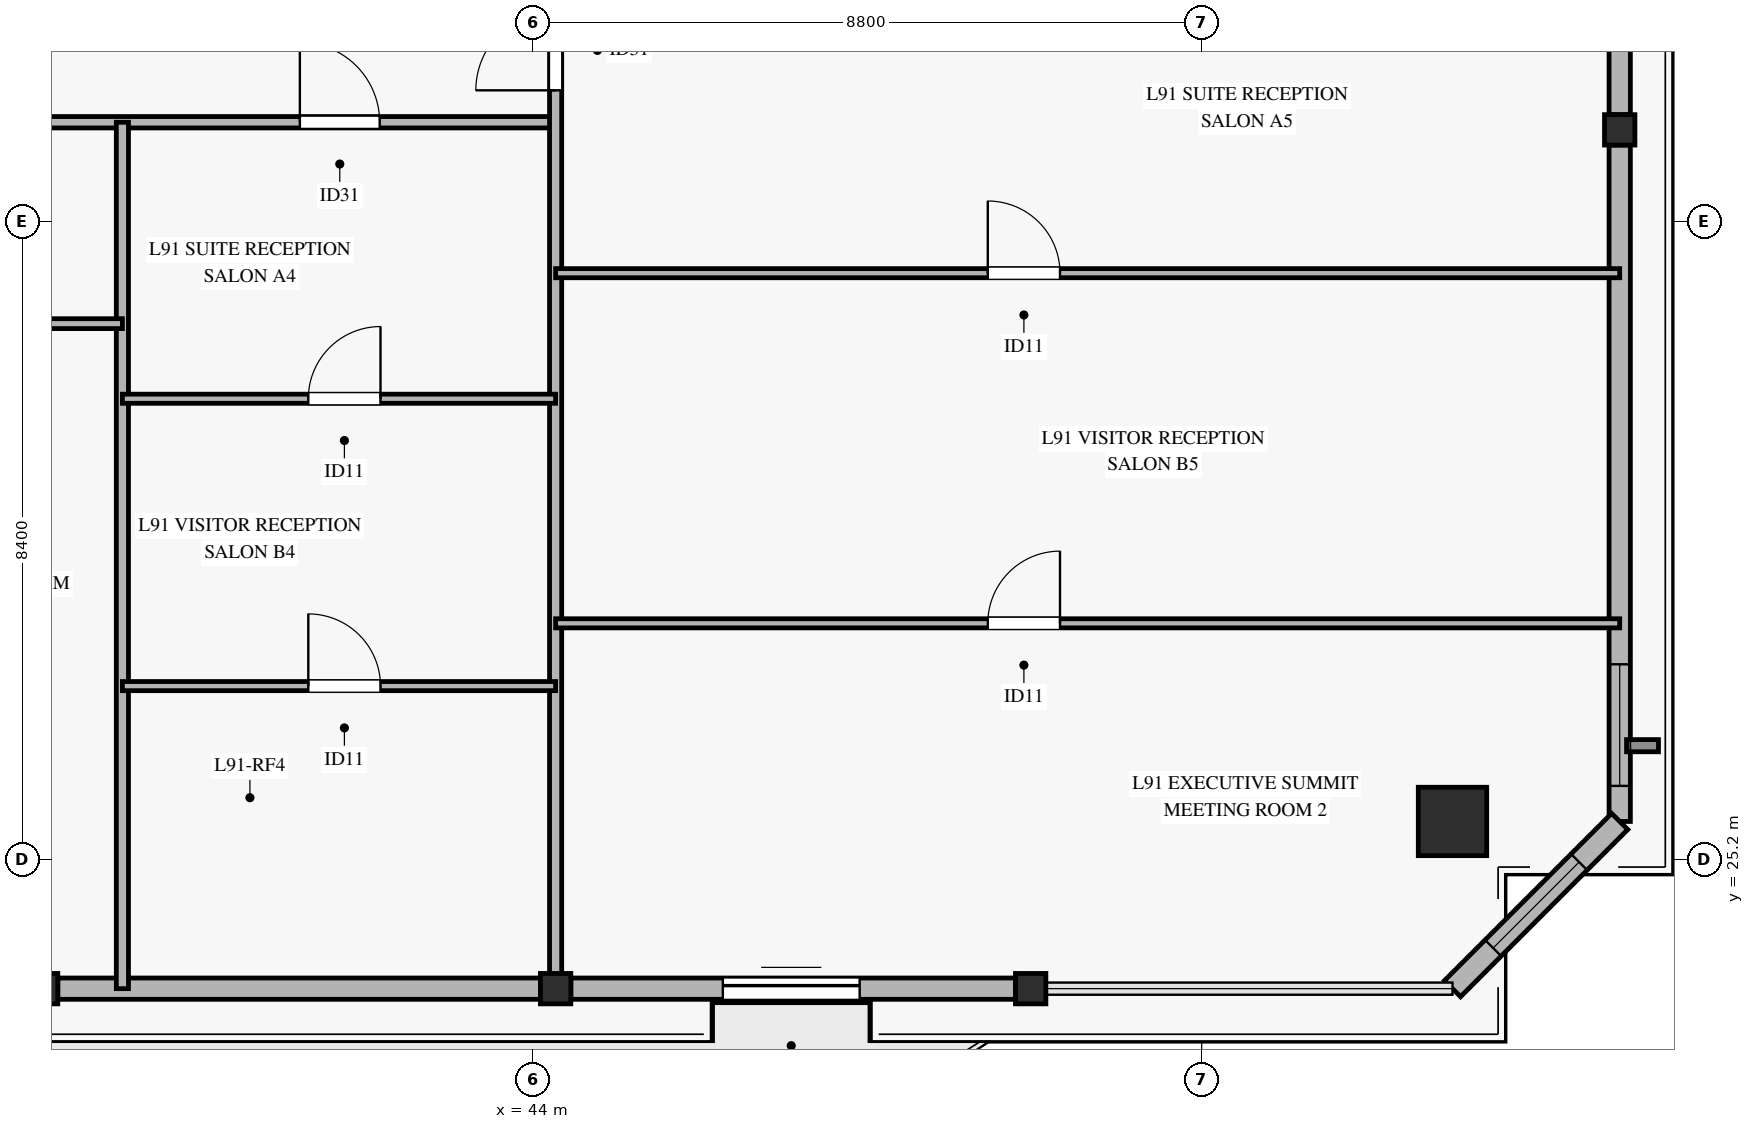
"""IFC4 building model, lengths in metres.
Left out: names, types, materials, properties, quantities, classifications, styles, units other than length and angle.
Written with IfcOpenShell. Run it as: python <this file> out.ifc"""

import sys

from ifc_helpers import new_model, si_unit, direction, frame, frame_2d, origin, origin_2d, place, context, subcontext, project, spatial, rectangle, hollow_rectangle, extrude, source, transform, mapped, element, fill, save


model = new_model("IFC4")
c1 = context("Model", 3, precision=1e-05, world=origin(), true_north=direction((0.0, 1.0)))
c2 = subcontext(c1, "Body", "Model", "MODEL_VIEW")
j1 = project(units=[si_unit("LENGTHUNIT", "METRE"), si_unit("PLANEANGLEUNIT", "RADIAN")], contexts=[c1])
p1 = place(None, origin())
s1 = spatial("IfcSite", under=j1, at=p1, CompositionType="ELEMENT")
p2 = place(p1, origin())
s2 = spatial("IfcBuilding", under=s1, at=p2, CompositionType="ELEMENT")
p3 = place(p2, frame((0.0, 0.0, 349.3)))
s3 = spatial("IfcBuildingStorey", under=s2, at=p3, CompositionType="ELEMENT", Elevation=349.3)
m1 = source(origin(), c2, "Body", "SweptSolid", [
    extrude(hollow_rectangle(XDim=0.9, YDim=0.9, WallThickness=0.04, at=origin_2d()), origin(), (0.0, 0.0, 1.0), 3.08),
])
p4 = place(p3, frame((56.1, 25.7, 0.0), z_axis=(0.0, 0.0, 1.0), x_axis=(1.0, 0.0, 0.0)))
e1 = element("IfcColumn", 1, at=p4, inside=s3, PredefinedType="COLUMN", context=c2, shape_type="MappedRepresentation", body=[
    mapped(m1, transform((0.0, 0.0, 0.0), x_axis=(1.0, 0.0, 0.0), y_axis=(0.0, 1.0, 0.0), z_axis=(0.0, 0.0, 1.0), scale=1.0)),
])
m2 = source(origin(), c2, "Body", "SweptSolid", [
    extrude(hollow_rectangle(XDim=0.4, YDim=0.4, WallThickness=0.02, at=origin_2d()), origin(), (0.0, 0.0, 1.0), 3.08),
])
for number, where, z_axis, x_axis in (
    (2, (37.55, 23.5, 0.0), (0.0, 0.0, 1.0), (1.0, 0.0, 0.0)),
    (3, (44.3, 23.5, 0.0), (0.0, 0.0, 1.0), (1.0, 0.0, 0.0)),
    (4, (50.55, 23.5, 0.0), (0.0, 0.0, 1.0), (1.0, 0.0, 0.0)),
    (5, (58.3, 34.8, 0.0), (0.0, 0.0, 1.0), (1.0, 0.0, 0.0)),
):
    element("IfcColumn", number, at=place(p3, frame(where, z_axis=z_axis, x_axis=x_axis)), inside=s3, PredefinedType="COLUMN", context=c2, shape_type="MappedRepresentation", body=[
        mapped(m2, transform((0.0, 0.0, 0.0), x_axis=(1.0, 0.0, 0.0), y_axis=(0.0, 1.0, 0.0), z_axis=(0.0, 0.0, 1.0), scale=1.0)),
    ])
p5 = place(p3, frame((37.75, 23.5, 0.0), z_axis=(0.0, 0.0, 1.0), x_axis=(1.0, 0.0, 0.0)))
e6 = element("IfcWall", 6, at=p5, inside=s3, PredefinedType="SOLIDWALL", context=c2, shape_type="SweptSolid", body=[
    extrude(rectangle(XDim=6.35, YDim=0.28, at=frame_2d((3.175, 0.0))), origin(), (0.0, 0.0, 1.0), 2.71),
])
p6 = place(p3, frame((44.5, 23.5, 0.0), z_axis=(0.0, 0.0, 1.0), x_axis=(1.0, 0.0, 0.0)))
e7 = element("IfcWall", 7, at=p6, inside=s3, PredefinedType="SOLIDWALL", context=c2, shape_type="SweptSolid", body=[
    extrude(rectangle(XDim=5.85, YDim=0.28, at=frame_2d((2.925, 0.0))), origin(), (0.0, 0.0, 1.0), 2.71),
])
p7 = place(p6, frame((2.0, 0.0, 0.0)))
e8 = element("IfcOpeningElement", 8, at=p7, cuts=e7, PredefinedType="OPENING", context=c2, shape_type="SweptSolid", body=[
    extrude(rectangle(XDim=1.8, YDim=2.25, at=frame_2d((0.9, 1.125))), frame((0.0, 0.15, 0.0), z_axis=(0.0, -1.0, 0.0), x_axis=(1.0, 0.0, 0.0)), (0.0, 0.0, 1.0), 0.3),
])
p8 = place(p3, frame((58.3, 25.7, 0.0), z_axis=(0.0, 0.0, 1.0), x_axis=(0.0, 1.0, 0.0)))
e9 = element("IfcWall", 9, at=p8, inside=s3, PredefinedType="SOLIDWALL", context=c2, shape_type="SweptSolid", body=[
    extrude(rectangle(XDim=8.9, YDim=0.28, at=frame_2d((4.45, 0.0))), origin(), (0.0, 0.0, 1.0), 2.71),
])
p9 = place(p8, frame((0.468, 0.0, 0.35)))
e10 = element("IfcOpeningElement", 10, at=p9, cuts=e9, PredefinedType="OPENING", context=c2, shape_type="SweptSolid", body=[
    extrude(rectangle(XDim=1.6, YDim=2.0, at=frame_2d((0.8, 1.0))), frame((0.0, 0.15, 0.0), z_axis=(0.0, -1.0, 0.0), x_axis=(1.0, 0.0, 0.0)), (0.0, 0.0, 1.0), 0.3),
])
p10 = place(p3, frame((58.3, 35.0, 0.0), z_axis=(0.0, 0.0, 1.0), x_axis=(0.0, 1.0, 0.0)))
e11 = element("IfcWall", 11, at=p10, inside=s3, PredefinedType="SOLIDWALL", context=c2, shape_type="SweptSolid", body=[
    extrude(rectangle(XDim=8.9, YDim=0.28, at=frame_2d((4.45, 0.0))), origin(), (0.0, 0.0, 1.0), 2.71),
])
p11 = place(p10, frame((3.734, 0.0, 0.35)))
e12 = element("IfcOpeningElement", 12, at=p11, cuts=e11, PredefinedType="OPENING", context=c2, shape_type="SweptSolid", body=[
    extrude(rectangle(XDim=2.2, YDim=2.1, at=frame_2d((1.1, 1.05))), frame((0.0, 0.15, 0.0), z_axis=(0.0, -1.0, 0.0), x_axis=(1.0, 0.0, 0.0)), (0.0, 0.0, 1.0), 0.3),
])
p12 = place(p3, frame((56.1, 23.5, 0.0), z_axis=(0.0, 0.0, 1.0), x_axis=(0.707106781187, 0.707106781187, 0.0)))
e13 = element("IfcWall", 13, at=p12, inside=s3, PredefinedType="SOLIDWALL", context=c2, shape_type="SweptSolid", body=[
    extrude(rectangle(XDim=3.111, YDim=0.3, at=frame_2d((1.556, 0.0))), origin(), (0.0, 0.0, 1.0), 2.71),
])
p13 = place(p12, frame((0.756, 0.0, 0.45)))
e14 = element("IfcOpeningElement", 14, at=p13, cuts=e13, PredefinedType="OPENING", context=c2, shape_type="SweptSolid", body=[
    extrude(rectangle(XDim=1.6, YDim=2.0, at=frame_2d((0.8, 1.0))), frame((0.0, 0.16, 0.0), z_axis=(0.0, -1.0, 0.0), x_axis=(1.0, 0.0, 0.0)), (0.0, 0.0, 1.0), 0.32),
])
p14 = place(p3, frame((21.4, 34.9, 0.0), z_axis=(0.0, 0.0, 1.0), x_axis=(1.0, 0.0, 0.0)))
e15 = element("IfcWall", 15, at=p14, inside=s3, PredefinedType="PARTITIONING", context=c2, shape_type="SweptSolid", body=[
    extrude(rectangle(XDim=22.9, YDim=0.15, at=frame_2d((11.45, 0.0))), origin(), (0.0, 0.0, 1.0), 2.365),
])
p15 = place(p14, frame((3.775, 0.0, 0.0)))
e16 = element("IfcOpeningElement", 16, at=p15, cuts=e15, PredefinedType="OPENING", context=c2, shape_type="SweptSolid", body=[
    extrude(rectangle(XDim=1.05, YDim=2.15, at=frame_2d((0.525, 1.075))), frame((0.0, 0.085, 0.0), z_axis=(0.0, -1.0, 0.0), x_axis=(1.0, 0.0, 0.0)), (0.0, 0.0, 1.0), 0.17),
])
p16 = place(p14, frame((12.375, 0.0, 0.0)))
e17 = element("IfcOpeningElement", 17, at=p16, cuts=e15, PredefinedType="OPENING", context=c2, shape_type="SweptSolid", body=[
    extrude(rectangle(XDim=1.05, YDim=2.15, at=frame_2d((0.525, 1.075))), frame((0.0, 0.085, 0.0), z_axis=(0.0, -1.0, 0.0), x_axis=(1.0, 0.0, 0.0)), (0.0, 0.0, 1.0), 0.17),
])
p17 = place(p14, frame((19.535, 0.0, 0.0)))
e18 = element("IfcOpeningElement", 18, at=p17, cuts=e15, PredefinedType="OPENING", context=c2, shape_type="SweptSolid", body=[
    extrude(rectangle(XDim=1.05, YDim=2.15, at=frame_2d((0.525, 1.075))), frame((0.0, 0.085, 0.0), z_axis=(0.0, -1.0, 0.0), x_axis=(1.0, 0.0, 0.0)), (0.0, 0.0, 1.0), 0.17),
])
p18 = place(p3, frame((38.6, 23.5, 0.0), z_axis=(0.0, 0.0, 1.0), x_axis=(0.0, 1.0, 0.0)))
e19 = element("IfcWall", 19, at=p18, inside=s3, PredefinedType="PARTITIONING", context=c2, shape_type="SweptSolid", body=[
    extrude(rectangle(XDim=11.4, YDim=0.16, at=frame_2d((5.7, 0.0))), origin(), (0.0, 0.0, 1.0), 2.665),
])
p19 = place(p3, frame((44.3, 23.5, 0.0), z_axis=(0.0, 0.0, 1.0), x_axis=(0.0, 1.0, 0.0)))
e20 = element("IfcWall", 20, at=p19, inside=s3, PredefinedType="PARTITIONING", context=c2, shape_type="SweptSolid", body=[
    extrude(rectangle(XDim=13.95, YDim=0.16, at=frame_2d((6.975, 0.0))), origin(), (0.0, 0.0, 1.0), 2.365),
])
p20 = place(p19, frame((11.82, 0.0, 0.0)))
e21 = element("IfcOpeningElement", 21, at=p20, cuts=e20, PredefinedType="OPENING", context=c2, shape_type="SweptSolid", body=[
    extrude(rectangle(XDim=1.05, YDim=2.15, at=frame_2d((0.525, 1.075))), frame((0.0, 0.09, 0.0), z_axis=(0.0, -1.0, 0.0), x_axis=(1.0, 0.0, 0.0)), (0.0, 0.0, 1.0), 0.18),
])
p21 = place(p3, frame((36.36, 32.25, 0.0), z_axis=(0.0, 0.0, 1.0), x_axis=(1.0, 0.0, 0.0)))
e22 = element("IfcWall", 22, at=p21, inside=s3, PredefinedType="PARTITIONING", context=c2, shape_type="SweptSolid", body=[
    extrude(rectangle(XDim=2.24, YDim=0.13, at=frame_2d((1.12, 0.0))), origin(), (0.0, 0.0, 1.0), 2.365),
])
p22 = place(p3, frame((38.6, 27.481, 0.0), z_axis=(0.0, 0.0, 1.0), x_axis=(1.0, 0.0, 0.0)))
e23 = element("IfcWall", 23, at=p22, inside=s3, PredefinedType="PARTITIONING", context=c2, shape_type="SweptSolid", body=[
    extrude(rectangle(XDim=5.7, YDim=0.12, at=frame_2d((2.85, 0.0))), origin(), (0.0, 0.0, 1.0), 2.365),
])
p23 = place(p22, frame((2.446, 0.0, 0.0)))
e24 = element("IfcOpeningElement", 24, at=p23, cuts=e23, PredefinedType="OPENING", context=c2, shape_type="SweptSolid", body=[
    extrude(rectangle(XDim=0.95, YDim=2.1, at=frame_2d((0.475, 1.05))), frame((0.0, 0.07, 0.0), z_axis=(0.0, -1.0, 0.0), x_axis=(1.0, 0.0, 0.0)), (0.0, 0.0, 1.0), 0.14),
])
p24 = place(p3, frame((38.6, 31.262, 0.0), z_axis=(0.0, 0.0, 1.0), x_axis=(1.0, 0.0, 0.0)))
e25 = element("IfcWall", 25, at=p24, inside=s3, PredefinedType="PARTITIONING", context=c2, shape_type="SweptSolid", body=[
    extrude(rectangle(XDim=5.7, YDim=0.12, at=frame_2d((2.85, 0.0))), origin(), (0.0, 0.0, 1.0), 2.365),
])
p25 = place(p24, frame((2.446, 0.0, 0.0)))
e26 = element("IfcOpeningElement", 26, at=p25, cuts=e25, PredefinedType="OPENING", context=c2, shape_type="SweptSolid", body=[
    extrude(rectangle(XDim=0.95, YDim=2.1, at=frame_2d((0.475, 1.05))), frame((0.0, 0.07, 0.0), z_axis=(0.0, -1.0, 0.0), x_axis=(1.0, 0.0, 0.0)), (0.0, 0.0, 1.0), 0.14),
])
p26 = place(p3, frame((44.3, 28.307, 0.0), z_axis=(0.0, 0.0, 1.0), x_axis=(1.0, 0.0, 0.0)))
e27 = element("IfcWall", 27, at=p26, inside=s3, PredefinedType="PARTITIONING", context=c2, shape_type="SweptSolid", body=[
    extrude(rectangle(XDim=14.0, YDim=0.12, at=frame_2d((7.0, 0.0))), origin(), (0.0, 0.0, 1.0), 2.365),
])
p27 = place(p26, frame((5.686, 0.0, 0.0)))
e28 = element("IfcOpeningElement", 28, at=p27, cuts=e27, PredefinedType="OPENING", context=c2, shape_type="SweptSolid", body=[
    extrude(rectangle(XDim=0.95, YDim=2.1, at=frame_2d((0.475, 1.05))), frame((0.0, 0.07, 0.0), z_axis=(0.0, -1.0, 0.0), x_axis=(1.0, 0.0, 0.0)), (0.0, 0.0, 1.0), 0.14),
])
p28 = place(p3, frame((44.3, 32.914, 0.0), z_axis=(0.0, 0.0, 1.0), x_axis=(1.0, 0.0, 0.0)))
e29 = element("IfcWall", 29, at=p28, inside=s3, PredefinedType="PARTITIONING", context=c2, shape_type="SweptSolid", body=[
    extrude(rectangle(XDim=14.0, YDim=0.12, at=frame_2d((7.0, 0.0))), origin(), (0.0, 0.0, 1.0), 2.365),
])
p29 = place(p28, frame((5.686, 0.0, 0.0)))
e30 = element("IfcOpeningElement", 30, at=p29, cuts=e29, PredefinedType="OPENING", context=c2, shape_type="SweptSolid", body=[
    extrude(rectangle(XDim=0.95, YDim=2.1, at=frame_2d((0.475, 1.05))), frame((0.0, 0.07, 0.0), z_axis=(0.0, -1.0, 0.0), x_axis=(1.0, 0.0, 0.0)), (0.0, 0.0, 1.0), 0.14),
])
m3 = source(origin(), c2, "Body", "SweptSolid", [
    extrude(rectangle(XDim=1.8, YDim=2.25, at=frame_2d((0.9, 1.125))), frame((0.0, 0.025, 0.0), z_axis=(0.0, -1.0, 0.0), x_axis=(1.0, 0.0, 0.0)), (0.0, 0.0, 1.0), 0.05),
])
p30 = place(p7, origin())
e31 = element("IfcDoor", 31, at=p30, inside=s3, OperationType="SLIDING_TO_LEFT", PredefinedType="DOOR", context=c2, shape_type="MappedRepresentation", body=[
    mapped(m3, transform((0.0, 0.0, 0.0), x_axis=(1.0, 0.0, 0.0), y_axis=(0.0, 1.0, 0.0), z_axis=(0.0, 0.0, 1.0), scale=1.0)),
])
fill(e8, e31)
m4 = source(origin(), c2, "Body", "SweptSolid", [
    extrude(rectangle(XDim=1.6, YDim=2.0, at=frame_2d((0.8, 1.0))), frame((0.0, 0.03, 0.0), z_axis=(0.0, -1.0, 0.0), x_axis=(1.0, 0.0, 0.0)), (0.0, 0.0, 1.0), 0.06),
])
p31 = place(p9, origin())
e32 = element("IfcWindow", 32, at=p31, inside=s3, PartitioningType="SINGLE_PANEL", PredefinedType="WINDOW", context=c2, shape_type="MappedRepresentation", body=[
    mapped(m4, transform((0.0, 0.0, 0.0), x_axis=(1.0, 0.0, 0.0), y_axis=(0.0, 1.0, 0.0), z_axis=(0.0, 0.0, 1.0), scale=1.0)),
])
fill(e10, e32)
p32 = place(p13, origin())
e33 = element("IfcWindow", 33, at=p32, inside=s3, PartitioningType="SINGLE_PANEL", PredefinedType="WINDOW", context=c2, shape_type="MappedRepresentation", body=[
    mapped(m4, transform((0.0, 0.0, 0.0), x_axis=(1.0, 0.0, 0.0), y_axis=(0.0, 1.0, 0.0), z_axis=(0.0, 0.0, 1.0), scale=1.0)),
])
fill(e14, e33)
m5 = source(origin(), c2, "Body", "SweptSolid", [
    extrude(rectangle(XDim=1.05, YDim=2.15, at=frame_2d((0.525, 1.075))), frame((0.0, 0.025, 0.0), z_axis=(0.0, -1.0, 0.0), x_axis=(1.0, 0.0, 0.0)), (0.0, 0.0, 1.0), 0.05),
])
p33 = place(p17, origin())
e34 = element("IfcDoor", 34, at=p33, inside=s3, OperationType="SINGLE_SWING_LEFT", PredefinedType="DOOR", context=c2, shape_type="MappedRepresentation", body=[
    mapped(m5, transform((0.0, 0.0, 0.0), x_axis=(1.0, 0.0, 0.0), y_axis=(0.0, 1.0, 0.0), z_axis=(0.0, 0.0, 1.0), scale=1.0)),
])
fill(e18, e34)
m6 = source(origin(), c2, "Body", "SweptSolid", [
    extrude(rectangle(XDim=0.95, YDim=2.1, at=frame_2d((0.475, 1.05))), frame((0.0, 0.025, 0.0), z_axis=(0.0, -1.0, 0.0), x_axis=(1.0, 0.0, 0.0)), (0.0, 0.0, 1.0), 0.05),
])
p34 = place(p25, origin())
e35 = element("IfcDoor", 35, at=p34, inside=s3, OperationType="SINGLE_SWING_RIGHT", PredefinedType="DOOR", context=c2, shape_type="MappedRepresentation", body=[
    mapped(m6, transform((0.0, 0.0, 0.0), x_axis=(1.0, 0.0, 0.0), y_axis=(0.0, 1.0, 0.0), z_axis=(0.0, 0.0, 1.0), scale=1.0)),
])
fill(e26, e35)
p35 = place(p23, origin())
e36 = element("IfcDoor", 36, at=p35, inside=s3, OperationType="SINGLE_SWING_LEFT", PredefinedType="DOOR", context=c2, shape_type="MappedRepresentation", body=[
    mapped(m6, transform((0.0, 0.0, 0.0), x_axis=(1.0, 0.0, 0.0), y_axis=(0.0, 1.0, 0.0), z_axis=(0.0, 0.0, 1.0), scale=1.0)),
])
fill(e24, e36)
p36 = place(p20, origin())
e37 = element("IfcDoor", 37, at=p36, inside=s3, OperationType="SINGLE_SWING_LEFT", PredefinedType="DOOR", context=c2, shape_type="MappedRepresentation", body=[
    mapped(m5, transform((0.0, 0.0, 0.0), x_axis=(1.0, 0.0, 0.0), y_axis=(0.0, 1.0, 0.0), z_axis=(0.0, 0.0, 1.0), scale=1.0)),
])
fill(e21, e37)
p37 = place(p29, origin())
e38 = element("IfcDoor", 38, at=p37, inside=s3, OperationType="SINGLE_SWING_LEFT", PredefinedType="DOOR", context=c2, shape_type="MappedRepresentation", body=[
    mapped(m6, transform((0.0, 0.0, 0.0), x_axis=(1.0, 0.0, 0.0), y_axis=(0.0, 1.0, 0.0), z_axis=(0.0, 0.0, 1.0), scale=1.0)),
])
fill(e30, e38)
p38 = place(p27, origin())
e39 = element("IfcDoor", 39, at=p38, inside=s3, OperationType="SINGLE_SWING_RIGHT", PredefinedType="DOOR", context=c2, shape_type="MappedRepresentation", body=[
    mapped(m6, transform((0.0, 0.0, 0.0), x_axis=(1.0, 0.0, 0.0), y_axis=(0.0, 1.0, 0.0), z_axis=(0.0, 0.0, 1.0), scale=1.0)),
])
fill(e28, e39)
save(model, sys.argv[1])
